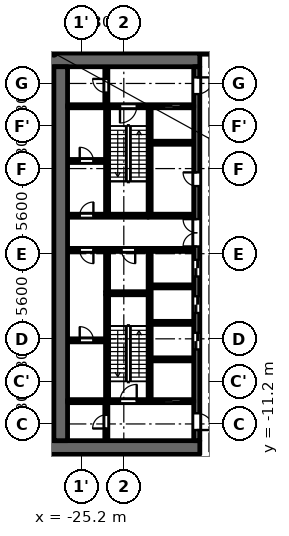
"""IFC4 building model, lengths in metres.
Left out: names, types, materials, properties, quantities, classifications, styles, units other than length and angle.
Written with IfcOpenShell. Run it as: python <this file> out.ifc"""

import sys

from ifc_helpers import new_model, si_unit, direction, frame, frame_2d, origin, place, context, subcontext, project, spatial, rectangle, extrude, element, fill, save


model = new_model("IFC4")
c1 = context("Model", 3, precision=1e-05, world=origin(), true_north=direction((0.0, 1.0)))
c2 = subcontext(c1, "Body", "Model", "MODEL_VIEW")
j1 = project(units=[si_unit("LENGTHUNIT", "METRE"), si_unit("PLANEANGLEUNIT", "RADIAN")], contexts=[c1])
p1 = place(None, origin())
s1 = spatial("IfcSite", under=j1, at=p1, CompositionType="ELEMENT")
p2 = place(p1, origin())
s2 = spatial("IfcBuilding", under=s1, at=p2, CompositionType="ELEMENT")
p3 = place(p2, frame((0.0, 0.0, 20.9)))
s3 = spatial("IfcBuildingStorey", under=s2, at=p3, CompositionType="ELEMENT", Elevation=20.9)
p4 = place(p3, frame((-23.5, -2.5, 0.0), z_axis=(0.0, 0.0, 1.0), x_axis=(0.0, 1.0, 0.0)))
e1 = element("IfcWall", 1, at=p4, inside=s3, PredefinedType="PARTITIONING", context=c2, shape_type="SweptSolid", body=[
    extrude(rectangle(XDim=2.65, YDim=0.2, at=frame_2d((1.325, 0.0))), origin(), (0.0, 0.0, 1.0), 4.45),
])
p5 = place(p3, frame((-20.7, 2.6, 0.0), z_axis=(0.0, 0.0, 1.0), x_axis=(0.0, 1.0, 0.0)))
e2 = element("IfcWall", 2, at=p5, inside=s3, PredefinedType="SHEAR", context=c2, shape_type="SweptSolid", body=[
    extrude(rectangle(XDim=7.0, YDim=0.2, at=frame_2d((3.5, 0.0))), origin(), (0.0, 0.0, 1.0), 4.45),
])
p6 = place(p3, frame((-20.7, -9.6, 0.0), z_axis=(0.0, 0.0, 1.0), x_axis=(0.0, 1.0, 0.0)))
e3 = element("IfcWall", 3, at=p6, inside=s3, PredefinedType="SHEAR", context=c2, shape_type="SweptSolid", body=[
    extrude(rectangle(XDim=9.75, YDim=0.2, at=frame_2d((4.875, 0.0))), origin(), (0.0, 0.0, 1.0), 4.45),
])
p7 = place(p3, frame((-20.8, 2.5, 0.0), z_axis=(0.0, 0.0, 1.0), x_axis=(-1.0, 0.0, 0.0)))
e4 = element("IfcWall", 4, at=p7, inside=s3, PredefinedType="SHEAR", context=c2, shape_type="SweptSolid", body=[
    extrude(rectangle(XDim=5.3, YDim=0.2, at=frame_2d((2.65, 0.0))), origin(), (0.0, 0.0, 1.0), 4.45),
])
p8 = place(p7, frame((3.6, 0.0, 0.0)))
e5 = element("IfcOpeningElement", 5, at=p8, cuts=e4, PredefinedType="OPENING", context=c2, shape_type="SweptSolid", body=[
    extrude(rectangle(XDim=0.9, YDim=2.1, at=frame_2d((0.45, 1.05))), frame((0.0, 0.11, 0.0), z_axis=(0.0, -1.0, 0.0), x_axis=(1.0, 0.0, 0.0)), (0.0, 0.0, 1.0), 0.22),
])
p9 = place(p3, frame((-20.8, 0.25, 0.0), z_axis=(0.0, 0.0, 1.0), x_axis=(-1.0, 0.0, 0.0)))
e6 = element("IfcWall", 6, at=p9, inside=s3, PredefinedType="PARTITIONING", context=c2, shape_type="SweptSolid", body=[
    extrude(rectangle(XDim=5.3, YDim=0.2, at=frame_2d((2.65, 0.0))), origin(), (0.0, 0.0, 1.0), 4.45),
])
p10 = place(p9, frame((0.85, 0.0, 0.0)))
e7 = element("IfcOpeningElement", 7, at=p10, cuts=e6, PredefinedType="OPENING", context=c2, shape_type="SweptSolid", body=[
    extrude(rectangle(XDim=0.9, YDim=2.1, at=frame_2d((0.45, 1.05))), frame((0.0, 0.11, 0.0), z_axis=(0.0, -1.0, 0.0), x_axis=(1.0, 0.0, 0.0)), (0.0, 0.0, 1.0), 0.22),
])
p11 = place(p9, frame((3.6, 0.0, 0.0)))
e8 = element("IfcOpeningElement", 8, at=p11, cuts=e6, PredefinedType="OPENING", context=c2, shape_type="SweptSolid", body=[
    extrude(rectangle(XDim=0.9, YDim=2.1, at=frame_2d((0.45, 1.05))), frame((0.0, 0.11, 0.0), z_axis=(0.0, -1.0, 0.0), x_axis=(1.0, 0.0, 0.0)), (0.0, 0.0, 1.0), 0.22),
])
for number, where, z_axis, x_axis in (
    (9, (-17.4, 12.75, 0.0), (0.0, 0.0, 1.0), (-1.0, 0.0, 0.0)),
    (10, (-17.4, -12.75, 0.0), (0.0, 0.0, 1.0), (-1.0, 0.0, 0.0)),
):
    element("IfcWall", number, at=place(p3, frame(where, z_axis=z_axis, x_axis=x_axis)), inside=s3, PredefinedType="SHEAR", context=c2, shape_type="SweptSolid", body=[
        extrude(rectangle(XDim=10.4, YDim=0.9, at=frame_2d((5.2, 0.0))), origin(), (0.0, 0.0, 1.0), 4.45),
    ])
p12 = place(p3, frame((-17.6, -12.3, 0.0), z_axis=(0.0, 0.0, 1.0), x_axis=(0.0, 1.0, 0.0)))
e11 = element("IfcWall", 11, at=p12, inside=s3, PredefinedType="SHEAR", context=c2, shape_type="SweptSolid", body=[
    extrude(rectangle(XDim=24.6, YDim=0.4, at=frame_2d((12.3, 0.0))), origin(), (0.0, 0.0, 1.0), 4.45),
])
p13 = place(p12, frame((6.0, 0.0, 0.0)))
e12 = element("IfcOpeningElement", 12, at=p13, cuts=e11, PredefinedType="OPENING", context=c2, shape_type="SweptSolid", body=[
    extrude(rectangle(XDim=1.1, YDim=2.1, at=frame_2d((0.55, 1.05))), frame((0.0, 0.21, 0.0), z_axis=(0.0, -1.0, 0.0), x_axis=(1.0, 0.0, 0.0)), (0.0, 0.0, 1.0), 0.42),
])
p14 = place(p12, frame((8.4, 0.0, 0.0)))
e13 = element("IfcOpeningElement", 13, at=p14, cuts=e11, PredefinedType="OPENING", context=c2, shape_type="SweptSolid", body=[
    extrude(rectangle(XDim=1.1, YDim=2.1, at=frame_2d((0.55, 1.05))), frame((0.0, 0.21, 0.0), z_axis=(0.0, -1.0, 0.0), x_axis=(1.0, 0.0, 0.0)), (0.0, 0.0, 1.0), 0.42),
])
p15 = place(p12, frame((10.8, 0.0, 0.0)))
e14 = element("IfcOpeningElement", 14, at=p15, cuts=e11, PredefinedType="OPENING", context=c2, shape_type="SweptSolid", body=[
    extrude(rectangle(XDim=1.1, YDim=2.1, at=frame_2d((0.55, 1.05))), frame((0.0, 0.21, 0.0), z_axis=(0.0, -1.0, 0.0), x_axis=(1.0, 0.0, 0.0)), (0.0, 0.0, 1.0), 0.42),
])
p16 = place(p12, frame((16.75, 0.0, 0.0)))
e15 = element("IfcOpeningElement", 15, at=p16, cuts=e11, PredefinedType="OPENING", context=c2, shape_type="SweptSolid", body=[
    extrude(rectangle(XDim=0.9, YDim=2.1, at=frame_2d((0.45, 1.05))), frame((0.0, 0.21, 0.0), z_axis=(0.0, -1.0, 0.0), x_axis=(1.0, 0.0, 0.0)), (0.0, 0.0, 1.0), 0.42),
])
p17 = place(p12, frame((22.8, 0.0, 0.0)))
e16 = element("IfcOpeningElement", 16, at=p17, cuts=e11, PredefinedType="OPENING", context=c2, shape_type="SweptSolid", body=[
    extrude(rectangle(XDim=1.1, YDim=2.1, at=frame_2d((0.55, 1.05))), frame((0.0, 0.21, 0.0), z_axis=(0.0, -1.0, 0.0), x_axis=(1.0, 0.0, 0.0)), (0.0, 0.0, 1.0), 0.42),
])
p18 = place(p12, frame((0.7, 0.0, 0.0)))
e17 = element("IfcOpeningElement", 17, at=p18, cuts=e11, PredefinedType="OPENING", context=c2, shape_type="SweptSolid", body=[
    extrude(rectangle(XDim=1.1, YDim=2.1, at=frame_2d((0.55, 1.05))), frame((0.0, 0.21, 0.0), z_axis=(0.0, -1.0, 0.0), x_axis=(1.0, 0.0, 0.0)), (0.0, 0.0, 1.0), 0.42),
])
p19 = place(p12, frame((12.775, 0.0, 0.0)))
e18 = element("IfcOpeningElement", 18, at=p19, cuts=e11, PredefinedType="OPENING", context=c2, shape_type="SweptSolid", body=[
    extrude(rectangle(XDim=1.8, YDim=2.1, at=frame_2d((0.9, 1.05))), frame((0.0, 0.21, 0.0), z_axis=(0.0, -1.0, 0.0), x_axis=(1.0, 0.0, 0.0)), (0.0, 0.0, 1.0), 0.42),
])
p20 = place(p3, frame((-26.55, -12.3, 0.0), z_axis=(0.0, 0.0, 1.0), x_axis=(0.0, 1.0, 0.0)))
e19 = element("IfcWall", 19, at=p20, inside=s3, PredefinedType="SHEAR", context=c2, shape_type="SweptSolid", body=[
    extrude(rectangle(XDim=24.6, YDim=0.9, at=frame_2d((12.3, 0.0))), origin(), (0.0, 0.0, 1.0), 4.45),
])
p21 = place(p3, frame((-23.55, 9.8, 0.0), z_axis=(0.0, 0.0, 1.0), x_axis=(0.0, 1.0, 0.0)))
e20 = element("IfcWall", 20, at=p21, inside=s3, PredefinedType="PARTITIONING", context=c2, shape_type="SweptSolid", body=[
    extrude(rectangle(XDim=2.5, YDim=0.2, at=frame_2d((1.25, 0.0))), origin(), (0.0, 0.0, 1.0), 4.45),
])
p22 = place(p21, frame((0.8, 0.0, 0.0)))
e21 = element("IfcOpeningElement", 21, at=p22, cuts=e20, PredefinedType="OPENING", context=c2, shape_type="SweptSolid", body=[
    extrude(rectangle(XDim=0.9, YDim=2.1, at=frame_2d((0.45, 1.05))), frame((0.0, 0.11, 0.0), z_axis=(0.0, -1.0, 0.0), x_axis=(1.0, 0.0, 0.0)), (0.0, 0.0, 1.0), 0.22),
])
p23 = place(p3, frame((-23.55, -12.3, 0.0), z_axis=(0.0, 0.0, 1.0), x_axis=(0.0, 1.0, 0.0)))
e22 = element("IfcWall", 22, at=p23, inside=s3, PredefinedType="PARTITIONING", context=c2, shape_type="SweptSolid", body=[
    extrude(rectangle(XDim=2.5, YDim=0.2, at=frame_2d((1.25, 0.0))), origin(), (0.0, 0.0, 1.0), 4.45),
])
p24 = place(p23, frame((0.8, 0.0, 0.0)))
e23 = element("IfcOpeningElement", 23, at=p24, cuts=e22, PredefinedType="OPENING", context=c2, shape_type="SweptSolid", body=[
    extrude(rectangle(XDim=0.9, YDim=2.1, at=frame_2d((0.45, 1.05))), frame((0.0, 0.11, 0.0), z_axis=(0.0, -1.0, 0.0), x_axis=(1.0, 0.0, 0.0)), (0.0, 0.0, 1.0), 0.22),
])
p25 = place(p3, frame((-23.6, -5.7, 0.0), z_axis=(0.0, 0.0, 1.0), x_axis=(-1.0, 0.0, 0.0)))
e24 = element("IfcWall", 24, at=p25, inside=s3, PredefinedType="PARTITIONING", context=c2, shape_type="SweptSolid", body=[
    extrude(rectangle(XDim=2.5, YDim=0.2, at=frame_2d((1.25, 0.0))), origin(), (0.0, 0.0, 1.0), 4.45),
])
p26 = place(p25, frame((0.8, 0.0, 0.0)))
e25 = element("IfcOpeningElement", 25, at=p26, cuts=e24, PredefinedType="OPENING", context=c2, shape_type="SweptSolid", body=[
    extrude(rectangle(XDim=0.9, YDim=2.1, at=frame_2d((0.45, 1.05))), frame((0.0, 0.11, 0.0), z_axis=(0.0, -1.0, 0.0), x_axis=(1.0, 0.0, 0.0)), (0.0, 0.0, 1.0), 0.22),
])
p27 = place(p3, frame((-23.6, 6.1, 0.0), z_axis=(0.0, 0.0, 1.0), x_axis=(-1.0, 0.0, 0.0)))
e26 = element("IfcWall", 26, at=p27, inside=s3, PredefinedType="PARTITIONING", context=c2, shape_type="SweptSolid", body=[
    extrude(rectangle(XDim=2.5, YDim=0.2, at=frame_2d((1.25, 0.0))), origin(), (0.0, 0.0, 1.0), 4.45),
])
p28 = place(p27, frame((0.8, 0.0, 0.0)))
e27 = element("IfcOpeningElement", 27, at=p28, cuts=e26, PredefinedType="OPENING", context=c2, shape_type="SweptSolid", body=[
    extrude(rectangle(XDim=0.9, YDim=2.1, at=frame_2d((0.45, 1.05))), frame((0.0, 0.11, 0.0), z_axis=(0.0, -1.0, 0.0), x_axis=(1.0, 0.0, 0.0)), (0.0, 0.0, 1.0), 0.22),
])
p29 = place(p3, frame((-17.8, -9.7, 0.0), z_axis=(0.0, 0.0, 1.0), x_axis=(-1.0, 0.0, 0.0)))
e28 = element("IfcWall", 28, at=p29, inside=s3, PredefinedType="SHEAR", context=c2, shape_type="SweptSolid", body=[
    extrude(rectangle(XDim=8.3, YDim=0.2, at=frame_2d((4.15, 0.0))), origin(), (0.0, 0.0, 1.0), 4.45),
])
p30 = place(p29, frame((0.85, 0.0, 0.0)))
e29 = element("IfcOpeningElement", 29, at=p30, cuts=e28, PredefinedType="OPENING", context=c2, shape_type="SweptSolid", body=[
    extrude(rectangle(XDim=1.1, YDim=2.1, at=frame_2d((0.55, 1.05))), frame((0.0, 0.11, 0.0), z_axis=(0.0, -1.0, 0.0), x_axis=(1.0, 0.0, 0.0)), (0.0, 0.0, 1.0), 0.22),
])
p31 = place(p29, frame((3.75, 0.0, 0.0)))
e30 = element("IfcOpeningElement", 30, at=p31, cuts=e28, PredefinedType="OPENING", context=c2, shape_type="SweptSolid", body=[
    extrude(rectangle(XDim=1.1, YDim=2.1, at=frame_2d((0.55, 1.05))), frame((0.0, 0.11, 0.0), z_axis=(0.0, -1.0, 0.0), x_axis=(1.0, 0.0, 0.0)), (0.0, 0.0, 1.0), 0.22),
])
for number, where, z_axis, x_axis in (
    (31, (-17.8, -6.95, 0.0), (0.0, 0.0, 1.0), (-1.0, 0.0, 0.0)),
    (32, (-17.8, -4.55, 0.0), (0.0, 0.0, 1.0), (-1.0, 0.0, 0.0)),
    (33, (-17.8, -2.15, 0.0), (0.0, 0.0, 1.0), (-1.0, 0.0, 0.0)),
):
    element("IfcWall", number, at=place(p3, frame(where, z_axis=z_axis, x_axis=x_axis)), inside=s3, PredefinedType="PARTITIONING", context=c2, shape_type="SweptSolid", body=[
        extrude(rectangle(XDim=2.8, YDim=0.2, at=frame_2d((1.4, 0.0))), origin(), (0.0, 0.0, 1.0), 4.45),
    ])
for number, where, z_axis, x_axis in (
    (34, (-17.8, 0.25, 0.0), (0.0, 0.0, 1.0), (-1.0, 0.0, 0.0)),
    (35, (-17.8, 2.5, 0.0), (0.0, 0.0, 1.0), (-1.0, 0.0, 0.0)),
):
    element("IfcWall", number, at=place(p3, frame(where, z_axis=z_axis, x_axis=x_axis)), inside=s3, PredefinedType="PARTITIONING", context=c2, shape_type="SweptSolid", body=[
        extrude(rectangle(XDim=3.0, YDim=0.2, at=frame_2d((1.5, 0.0))), origin(), (0.0, 0.0, 1.0), 4.45),
    ])
p32 = place(p3, frame((-17.8, 7.3, 0.0), z_axis=(0.0, 0.0, 1.0), x_axis=(-1.0, 0.0, 0.0)))
e36 = element("IfcWall", 36, at=p32, inside=s3, PredefinedType="PARTITIONING", context=c2, shape_type="SweptSolid", body=[
    extrude(rectangle(XDim=2.8, YDim=0.2, at=frame_2d((1.4, 0.0))), origin(), (0.0, 0.0, 1.0), 4.45),
])
p33 = place(p3, frame((-17.8, 9.7, 0.0), z_axis=(0.0, 0.0, 1.0), x_axis=(-1.0, 0.0, 0.0)))
e37 = element("IfcWall", 37, at=p33, inside=s3, PredefinedType="SHEAR", context=c2, shape_type="SweptSolid", body=[
    extrude(rectangle(XDim=8.3, YDim=0.2, at=frame_2d((4.15, 0.0))), origin(), (0.0, 0.0, 1.0), 4.45),
])
p34 = place(p33, frame((0.85, 0.0, 0.0)))
e38 = element("IfcOpeningElement", 38, at=p34, cuts=e37, PredefinedType="OPENING", context=c2, shape_type="SweptSolid", body=[
    extrude(rectangle(XDim=1.1, YDim=2.1, at=frame_2d((0.55, 1.05))), frame((0.0, 0.11, 0.0), z_axis=(0.0, -1.0, 0.0), x_axis=(1.0, 0.0, 0.0)), (0.0, 0.0, 1.0), 0.22),
])
p35 = place(p33, frame((3.75, 0.0, 0.0)))
e39 = element("IfcOpeningElement", 39, at=p35, cuts=e37, PredefinedType="OPENING", context=c2, shape_type="SweptSolid", body=[
    extrude(rectangle(XDim=1.1, YDim=2.1, at=frame_2d((0.55, 1.05))), frame((0.0, 0.11, 0.0), z_axis=(0.0, -1.0, 0.0), x_axis=(1.0, 0.0, 0.0)), (0.0, 0.0, 1.0), 0.22),
])
p36 = place(p3, frame((-23.5, 2.6, 0.0), z_axis=(0.0, 0.0, 1.0), x_axis=(0.0, 1.0, 0.0)))
e40 = element("IfcWall", 40, at=p36, inside=s3, PredefinedType="SHEAR", context=c2, shape_type="SweptSolid", body=[
    extrude(rectangle(XDim=7.0, YDim=0.2, at=frame_2d((3.5, 0.0))), origin(), (0.0, 0.0, 1.0), 4.45),
])
p37 = place(p3, frame((-23.5, -9.6, 0.0), z_axis=(0.0, 0.0, 1.0), x_axis=(0.0, 1.0, 0.0)))
e41 = element("IfcWall", 41, at=p37, inside=s3, PredefinedType="SHEAR", context=c2, shape_type="SweptSolid", body=[
    extrude(rectangle(XDim=6.9, YDim=0.2, at=frame_2d((3.45, 0.0))), origin(), (0.0, 0.0, 1.0), 4.45),
])
p38 = place(p3, frame((-20.8, -2.6, 0.0), z_axis=(0.0, 0.0, 1.0), x_axis=(-1.0, 0.0, 0.0)))
e42 = element("IfcWall", 42, at=p38, inside=s3, PredefinedType="SHEAR", context=c2, shape_type="SweptSolid", body=[
    extrude(rectangle(XDim=2.8, YDim=0.2, at=frame_2d((1.4, 0.0))), origin(), (0.0, 0.0, 1.0), 4.45),
])
p39 = place(p3, frame((-17.4, 13.2, 0.0), z_axis=(0.0, 0.0, 1.0), x_axis=(1.0, 0.0, 0.0)))
e43 = element("IfcWall", 43, at=p39, inside=s3, PredefinedType="PARTITIONING", context=c2, shape_type="SweptSolid", body=[
    extrude(rectangle(XDim=34.8, YDim=0.15, at=frame_2d((17.4, 0.0))), origin(), (0.0, 0.0, 1.0), 4.45),
])
p40 = place(p39, frame((3.05, 0.0, 0.0)))
e44 = element("IfcOpeningElement", 44, at=p40, cuts=e43, PredefinedType="OPENING", context=c2, shape_type="SweptSolid", body=[
    extrude(rectangle(XDim=1.8, YDim=2.1, at=frame_2d((0.9, 1.05))), frame((0.0, 0.085, 0.0), z_axis=(0.0, -1.0, 0.0), x_axis=(1.0, 0.0, 0.0)), (0.0, 0.0, 1.0), 0.17),
])
p41 = place(p39, frame((0.75, 0.0, 0.0)))
e45 = element("IfcOpeningElement", 45, at=p41, cuts=e43, PredefinedType="OPENING", context=c2, shape_type="SweptSolid", body=[
    extrude(rectangle(XDim=1.0, YDim=2.1, at=frame_2d((0.5, 1.05))), frame((0.0, 0.085, 0.0), z_axis=(0.0, -1.0, 0.0), x_axis=(1.0, 0.0, 0.0)), (0.0, 0.0, 1.0), 0.17),
])
p42 = place(p39, frame((33.15, 0.0, 0.0)))
e46 = element("IfcOpeningElement", 46, at=p42, cuts=e43, PredefinedType="OPENING", context=c2, shape_type="SweptSolid", body=[
    extrude(rectangle(XDim=1.0, YDim=2.1, at=frame_2d((0.5, 1.05))), frame((0.0, 0.085, 0.0), z_axis=(0.0, -1.0, 0.0), x_axis=(1.0, 0.0, 0.0)), (0.0, 0.0, 1.0), 0.17),
])
p43 = place(p30, origin())
e47 = element("IfcDoor", 47, at=p43, inside=s3, OperationType="DOUBLE_DOOR_SLIDING", PredefinedType="DOOR", context=c2, shape_type="SweptSolid", body=[
    extrude(rectangle(XDim=1.1, YDim=2.1, at=frame_2d((0.55, 1.05))), frame((0.0, 0.025, 0.0), z_axis=(0.0, -1.0, 0.0), x_axis=(1.0, 0.0, 0.0)), (0.0, 0.0, 1.0), 0.05),
])
fill(e29, e47)
p44 = place(p13, origin())
e48 = element("IfcDoor", 48, at=p44, inside=s3, OperationType="DOUBLE_DOOR_SLIDING", PredefinedType="DOOR", context=c2, shape_type="SweptSolid", body=[
    extrude(rectangle(XDim=1.1, YDim=2.1, at=frame_2d((0.55, 1.05))), frame((0.0, 0.025, 0.0), z_axis=(0.0, -1.0, 0.0), x_axis=(1.0, 0.0, 0.0)), (0.0, 0.0, 1.0), 0.05),
])
fill(e12, e48)
p45 = place(p14, origin())
e49 = element("IfcDoor", 49, at=p45, inside=s3, OperationType="DOUBLE_DOOR_SLIDING", PredefinedType="DOOR", context=c2, shape_type="SweptSolid", body=[
    extrude(rectangle(XDim=1.1, YDim=2.1, at=frame_2d((0.55, 1.05))), frame((0.0, 0.025, 0.0), z_axis=(0.0, -1.0, 0.0), x_axis=(1.0, 0.0, 0.0)), (0.0, 0.0, 1.0), 0.05),
])
fill(e13, e49)
p46 = place(p15, origin())
e50 = element("IfcDoor", 50, at=p46, inside=s3, OperationType="DOUBLE_DOOR_SLIDING", PredefinedType="DOOR", context=c2, shape_type="SweptSolid", body=[
    extrude(rectangle(XDim=1.1, YDim=2.1, at=frame_2d((0.55, 1.05))), frame((0.0, 0.025, 0.0), z_axis=(0.0, -1.0, 0.0), x_axis=(1.0, 0.0, 0.0)), (0.0, 0.0, 1.0), 0.05),
])
fill(e14, e50)
p47 = place(p16, origin())
e51 = element("IfcDoor", 51, at=p47, inside=s3, OperationType="SINGLE_SWING_LEFT", PredefinedType="DOOR", context=c2, shape_type="SweptSolid", body=[
    extrude(rectangle(XDim=0.9, YDim=2.1, at=frame_2d((0.45, 1.05))), frame((0.0, 0.025, 0.0), z_axis=(0.0, -1.0, 0.0), x_axis=(1.0, 0.0, 0.0)), (0.0, 0.0, 1.0), 0.05),
])
fill(e15, e51)
p48 = place(p34, origin())
e52 = element("IfcDoor", 52, at=p48, inside=s3, OperationType="DOUBLE_DOOR_SLIDING", PredefinedType="DOOR", context=c2, shape_type="SweptSolid", body=[
    extrude(rectangle(XDim=1.1, YDim=2.1, at=frame_2d((0.55, 1.05))), frame((0.0, 0.025, 0.0), z_axis=(0.0, -1.0, 0.0), x_axis=(1.0, 0.0, 0.0)), (0.0, 0.0, 1.0), 0.05),
])
fill(e38, e52)
p49 = place(p17, origin())
e53 = element("IfcDoor", 53, at=p49, inside=s3, OperationType="SINGLE_SWING_RIGHT", PredefinedType="DOOR", context=c2, shape_type="SweptSolid", body=[
    extrude(rectangle(XDim=1.1, YDim=2.1, at=frame_2d((0.55, 1.05))), frame((0.0, 0.025, 0.0), z_axis=(0.0, -1.0, 0.0), x_axis=(1.0, 0.0, 0.0)), (0.0, 0.0, 1.0), 0.05),
])
fill(e16, e53)
p50 = place(p18, origin())
e54 = element("IfcDoor", 54, at=p50, inside=s3, OperationType="SINGLE_SWING_LEFT", PredefinedType="DOOR", context=c2, shape_type="SweptSolid", body=[
    extrude(rectangle(XDim=1.1, YDim=2.1, at=frame_2d((0.55, 1.05))), frame((0.0, 0.025, 0.0), z_axis=(0.0, -1.0, 0.0), x_axis=(1.0, 0.0, 0.0)), (0.0, 0.0, 1.0), 0.05),
])
fill(e17, e54)
p51 = place(p22, origin())
e55 = element("IfcDoor", 55, at=p51, inside=s3, OperationType="SINGLE_SWING_LEFT", PredefinedType="DOOR", context=c2, shape_type="SweptSolid", body=[
    extrude(rectangle(XDim=0.9, YDim=2.1, at=frame_2d((0.45, 1.05))), frame((0.0, 0.025, 0.0), z_axis=(0.0, -1.0, 0.0), x_axis=(1.0, 0.0, 0.0)), (0.0, 0.0, 1.0), 0.05),
])
fill(e21, e55)
p52 = place(p24, origin())
e56 = element("IfcDoor", 56, at=p52, inside=s3, OperationType="SINGLE_SWING_RIGHT", PredefinedType="DOOR", context=c2, shape_type="SweptSolid", body=[
    extrude(rectangle(XDim=0.9, YDim=2.1, at=frame_2d((0.45, 1.05))), frame((0.0, 0.025, 0.0), z_axis=(0.0, -1.0, 0.0), x_axis=(1.0, 0.0, 0.0)), (0.0, 0.0, 1.0), 0.05),
])
fill(e23, e56)
p53 = place(p35, origin())
e57 = element("IfcDoor", 57, at=p53, inside=s3, OperationType="SINGLE_SWING_LEFT", PredefinedType="DOOR", context=c2, shape_type="SweptSolid", body=[
    extrude(rectangle(XDim=1.1, YDim=2.1, at=frame_2d((0.55, 1.05))), frame((0.0, 0.025, 0.0), z_axis=(0.0, -1.0, 0.0), x_axis=(1.0, 0.0, 0.0)), (0.0, 0.0, 1.0), 0.05),
])
fill(e39, e57)
p54 = place(p31, origin())
e58 = element("IfcDoor", 58, at=p54, inside=s3, OperationType="SINGLE_SWING_LEFT", PredefinedType="DOOR", context=c2, shape_type="SweptSolid", body=[
    extrude(rectangle(XDim=1.1, YDim=2.1, at=frame_2d((0.55, 1.05))), frame((0.0, 0.025, 0.0), z_axis=(0.0, -1.0, 0.0), x_axis=(1.0, 0.0, 0.0)), (0.0, 0.0, 1.0), 0.05),
])
fill(e30, e58)
p55 = place(p19, origin())
e59 = element("IfcDoor", 59, at=p55, inside=s3, OperationType="DOUBLE_DOOR_SINGLE_SWING", PredefinedType="DOOR", context=c2, shape_type="SweptSolid", body=[
    extrude(rectangle(XDim=1.8, YDim=2.1, at=frame_2d((0.9, 1.05))), frame((0.0, 0.025, 0.0), z_axis=(0.0, -1.0, 0.0), x_axis=(1.0, 0.0, 0.0)), (0.0, 0.0, 1.0), 0.05),
])
fill(e18, e59)
p56 = place(p10, origin())
e60 = element("IfcDoor", 60, at=p56, inside=s3, OperationType="SINGLE_SWING_RIGHT", PredefinedType="DOOR", context=c2, shape_type="SweptSolid", body=[
    extrude(rectangle(XDim=0.9, YDim=2.1, at=frame_2d((0.45, 1.05))), frame((0.0, 0.025, 0.0), z_axis=(0.0, -1.0, 0.0), x_axis=(1.0, 0.0, 0.0)), (0.0, 0.0, 1.0), 0.05),
])
fill(e7, e60)
p57 = place(p26, origin())
e61 = element("IfcDoor", 61, at=p57, inside=s3, OperationType="SINGLE_SWING_RIGHT", PredefinedType="DOOR", context=c2, shape_type="SweptSolid", body=[
    extrude(rectangle(XDim=0.9, YDim=2.1, at=frame_2d((0.45, 1.05))), frame((0.0, 0.025, 0.0), z_axis=(0.0, -1.0, 0.0), x_axis=(1.0, 0.0, 0.0)), (0.0, 0.0, 1.0), 0.05),
])
fill(e25, e61)
p58 = place(p11, origin())
e62 = element("IfcDoor", 62, at=p58, inside=s3, OperationType="SINGLE_SWING_RIGHT", PredefinedType="DOOR", context=c2, shape_type="SweptSolid", body=[
    extrude(rectangle(XDim=0.9, YDim=2.1, at=frame_2d((0.45, 1.05))), frame((0.0, 0.025, 0.0), z_axis=(0.0, -1.0, 0.0), x_axis=(1.0, 0.0, 0.0)), (0.0, 0.0, 1.0), 0.05),
])
fill(e8, e62)
p59 = place(p28, origin())
e63 = element("IfcDoor", 63, at=p59, inside=s3, OperationType="SINGLE_SWING_RIGHT", PredefinedType="DOOR", context=c2, shape_type="SweptSolid", body=[
    extrude(rectangle(XDim=0.9, YDim=2.1, at=frame_2d((0.45, 1.05))), frame((0.0, 0.025, 0.0), z_axis=(0.0, -1.0, 0.0), x_axis=(1.0, 0.0, 0.0)), (0.0, 0.0, 1.0), 0.05),
])
fill(e27, e63)
p60 = place(p8, origin())
e64 = element("IfcDoor", 64, at=p60, inside=s3, OperationType="SINGLE_SWING_LEFT", PredefinedType="DOOR", context=c2, shape_type="SweptSolid", body=[
    extrude(rectangle(XDim=0.9, YDim=2.1, at=frame_2d((0.45, 1.05))), frame((0.0, 0.025, 0.0), z_axis=(0.0, -1.0, 0.0), x_axis=(1.0, 0.0, 0.0)), (0.0, 0.0, 1.0), 0.05),
])
fill(e5, e64)
save(model, sys.argv[1])
